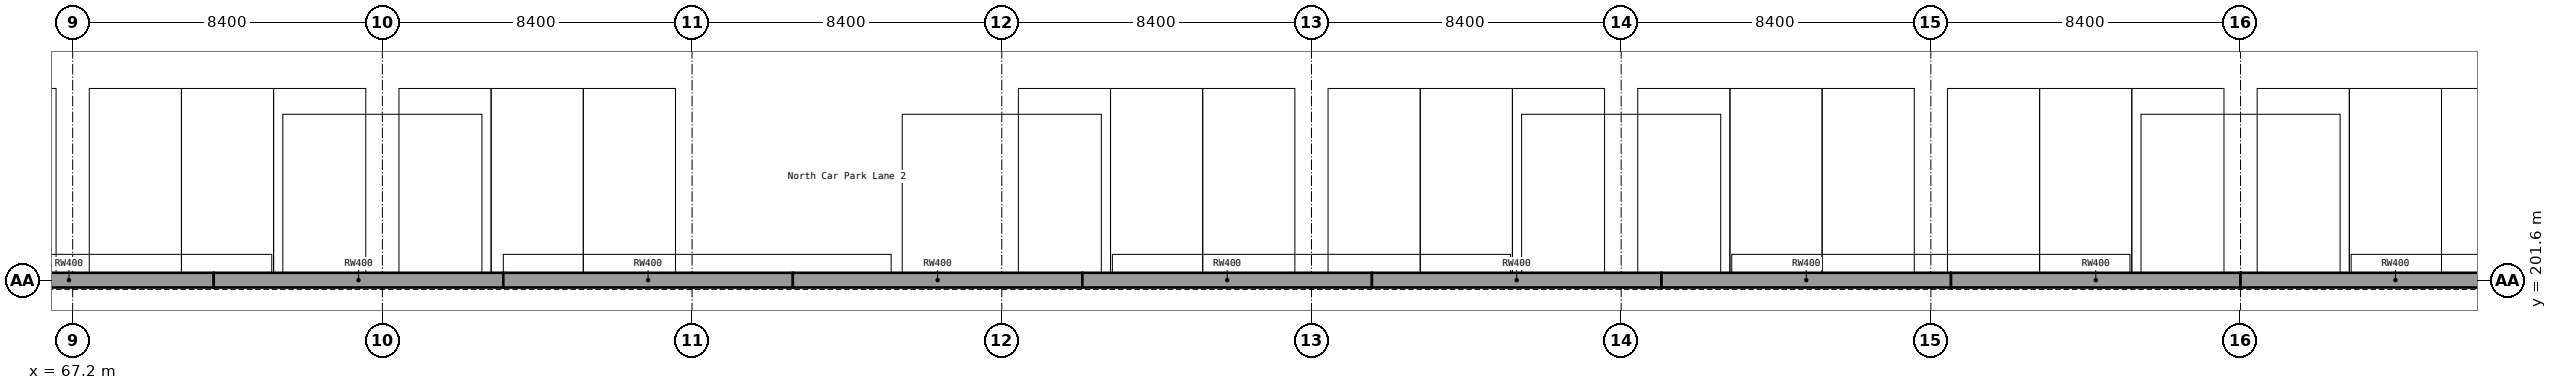
"""IFC4 building model, lengths in metres.
Left out: names, types, materials, properties, quantities, classifications, styles, units other than length and angle.
Written with IfcOpenShell. Run it as: python <this file> out.ifc"""

import sys

from ifc_helpers import new_model, si_unit, direction, frame, frame_2d, origin, place, context, subcontext, project, spatial, rectangle, extrude, element, save


model = new_model("IFC4")
c1 = context("Model", 3, precision=1e-05, world=origin(), true_north=direction((0.0, 1.0)))
c2 = subcontext(c1, "Body", "Model", "MODEL_VIEW")
j1 = project(units=[si_unit("LENGTHUNIT", "METRE"), si_unit("PLANEANGLEUNIT", "RADIAN")], contexts=[c1])
p1 = place(None, origin())
s1 = spatial("IfcSite", under=j1, at=p1, CompositionType="ELEMENT")
p2 = place(p1, origin())
s2 = spatial("IfcBuilding", under=s1, at=p2, CompositionType="ELEMENT")
p3 = place(p2, frame((0.0, 0.0, -3.0)))
s3 = spatial("IfcBuildingStorey", under=s2, at=p3, CompositionType="ELEMENT", Elevation=-3.0)
for number, where, z_axis, x_axis in (
    (1, (63.173, 201.6, 0.0), (0.0, 0.0, 1.0), (1.0, 0.0, 0.0)),
    (2, (71.027, 201.6, 0.0), (0.0, 0.0, 1.0), (1.0, 0.0, 0.0)),
):
    element("IfcWall", number, at=place(p3, frame(where, z_axis=z_axis, x_axis=x_axis)), inside=s3, PredefinedType="SOLIDWALL", context=c2, shape_type="SweptSolid", body=[
        extrude(rectangle(XDim=7.853, YDim=0.4, at=frame_2d((3.927, 0.0))), origin(), (0.0, 0.0, 1.0), 3.0),
    ])
p4 = place(p3, frame((78.88, 201.6, 0.0), z_axis=(0.0, 0.0, 1.0), x_axis=(1.0, 0.0, 0.0)))
e3 = element("IfcWall", 3, at=p4, inside=s3, PredefinedType="SOLIDWALL", context=c2, shape_type="SweptSolid", body=[
    extrude(rectangle(XDim=7.854, YDim=0.4, at=frame_2d((3.927, 0.0))), origin(), (0.0, 0.0, 1.0), 3.0),
])
for number, where, z_axis, x_axis in (
    (4, (86.733, 201.6, 0.0), (0.0, 0.0, 1.0), (1.0, 0.0, 0.0)),
    (5, (94.587, 201.6, 0.0), (0.0, 0.0, 1.0), (1.0, 0.0, 0.0)),
    (6, (102.44, 201.6, 0.0), (0.0, 0.0, 1.0), (1.0, 0.0, 0.0)),
):
    element("IfcWall", number, at=place(p3, frame(where, z_axis=z_axis, x_axis=x_axis)), inside=s3, PredefinedType="SOLIDWALL", context=c2, shape_type="SweptSolid", body=[
        extrude(rectangle(XDim=7.853, YDim=0.4, at=frame_2d((3.927, 0.0))), origin(), (0.0, 0.0, 1.0), 3.0),
    ])
p5 = place(p3, frame((110.293, 201.6, 0.0), z_axis=(0.0, 0.0, 1.0), x_axis=(1.0, 0.0, 0.0)))
e7 = element("IfcWall", 7, at=p5, inside=s3, PredefinedType="SOLIDWALL", context=c2, shape_type="SweptSolid", body=[
    extrude(rectangle(XDim=7.854, YDim=0.4, at=frame_2d((3.927, 0.0))), origin(), (0.0, 0.0, 1.0), 3.0),
])
p6 = place(p3, frame((118.147, 201.6, 0.0), z_axis=(0.0, 0.0, 1.0), x_axis=(1.0, 0.0, 0.0)))
e8 = element("IfcWall", 8, at=p6, inside=s3, PredefinedType="SOLIDWALL", context=c2, shape_type="SweptSolid", body=[
    extrude(rectangle(XDim=7.853, YDim=0.4, at=frame_2d((3.927, 0.0))), origin(), (0.0, 0.0, 1.0), 3.0),
])
p7 = place(p3, frame((126.0, 201.6, 0.0), z_axis=(0.0, 0.0, 1.0), x_axis=(1.0, 0.0, 0.0)))
e9 = element("IfcWall", 9, at=p7, inside=s3, PredefinedType="SOLIDWALL", context=c2, shape_type="SweptSolid", body=[
    extrude(rectangle(XDim=8.4, YDim=0.4, at=frame_2d((4.2, 0.0))), origin(), (0.0, 0.0, 1.0), 3.0),
])
save(model, sys.argv[1])
